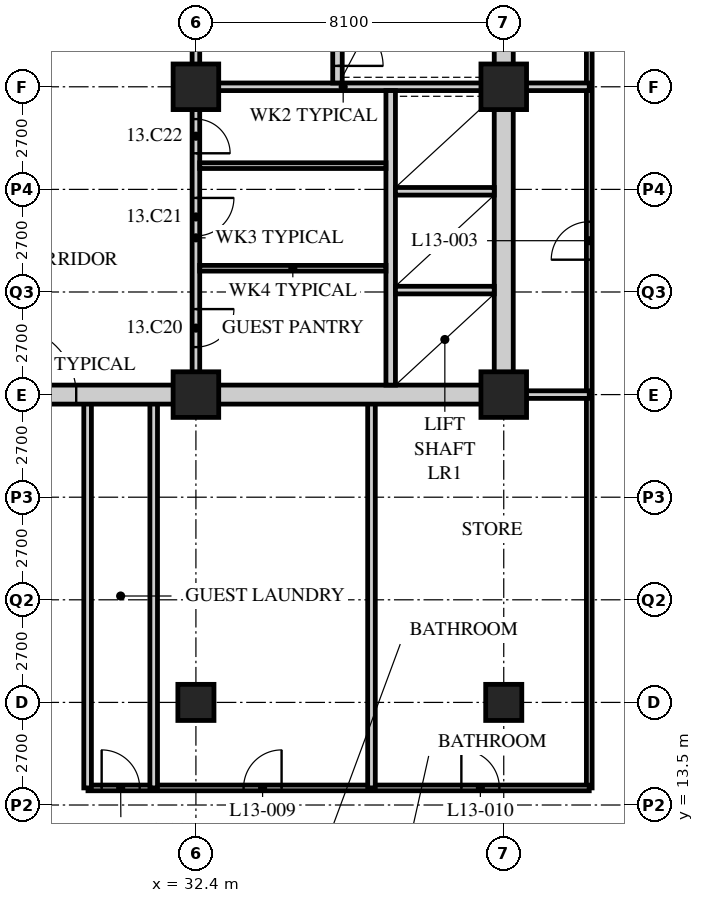
"""IFC4 building model, lengths in metres.
Left out: names, types, materials, properties, quantities, classifications, styles, units other than length and angle.
Written with IfcOpenShell. Run it as: python <this file> out.ifc"""

import sys

from ifc_helpers import new_model, si_unit, direction, frame, frame_2d, origin, origin_2d, place, context, subcontext, project, spatial, rectangle, hollow_rectangle, extrude, element, fill, save


model = new_model("IFC4")
c1 = context("Model", 3, precision=1e-05, world=origin(), true_north=direction((0.0, 1.0)))
c2 = subcontext(c1, "Body", "Model", "MODEL_VIEW")
j1 = project(units=[si_unit("LENGTHUNIT", "METRE"), si_unit("PLANEANGLEUNIT", "RADIAN")], contexts=[c1])
p1 = place(None, origin())
s1 = spatial("IfcSite", under=j1, at=p1, CompositionType="ELEMENT")
p2 = place(p1, origin())
s2 = spatial("IfcBuilding", under=s1, at=p2, CompositionType="ELEMENT")
p3 = place(p2, frame((0.0, 0.0, 56.8)))
s3 = spatial("IfcBuildingStorey", under=s2, at=p3, CompositionType="ELEMENT", Elevation=56.8)
p4 = place(p3, frame((32.4, 16.2, 0.0), z_axis=(0.0, 0.0, 1.0), x_axis=(1.0, 0.0, 0.0)))
e1 = element("IfcColumn", 1, at=p4, inside=s3, PredefinedType="COLUMN", context=c2, shape_type="SweptSolid", body=[
    extrude(hollow_rectangle(XDim=0.95, YDim=0.95, WallThickness=0.095, at=origin_2d()), origin(), (0.0, 0.0, 1.0), 3.4),
])
for number, where, z_axis, x_axis in (
    (2, (32.4, 24.3, 0.0), (0.0, 0.0, 1.0), (1.0, 0.0, 0.0)),
    (3, (32.4, 32.4, 0.0), (0.0, 0.0, 1.0), (1.0, 0.0, 0.0)),
):
    element("IfcColumn", number, at=place(p3, frame(where, z_axis=z_axis, x_axis=x_axis)), inside=s3, PredefinedType="COLUMN", context=c2, shape_type="SweptSolid", body=[
        extrude(hollow_rectangle(XDim=1.2, YDim=1.2, WallThickness=0.12, at=origin_2d()), origin(), (0.0, 0.0, 1.0), 3.4),
    ])
p5 = place(p3, frame((40.5, 16.2, 0.0), z_axis=(0.0, 0.0, 1.0), x_axis=(1.0, 0.0, 0.0)))
e4 = element("IfcColumn", 4, at=p5, inside=s3, PredefinedType="COLUMN", context=c2, shape_type="SweptSolid", body=[
    extrude(hollow_rectangle(XDim=0.95, YDim=0.95, WallThickness=0.095, at=origin_2d()), origin(), (0.0, 0.0, 1.0), 3.4),
])
for number, where, z_axis, x_axis in (
    (5, (40.5, 24.3, 0.0), (0.0, 0.0, 1.0), (1.0, 0.0, 0.0)),
    (6, (40.5, 32.4, 0.0), (0.0, 0.0, 1.0), (1.0, 0.0, 0.0)),
):
    element("IfcColumn", number, at=place(p3, frame(where, z_axis=z_axis, x_axis=x_axis)), inside=s3, PredefinedType="COLUMN", context=c2, shape_type="SweptSolid", body=[
        extrude(hollow_rectangle(XDim=1.2, YDim=1.2, WallThickness=0.12, at=origin_2d()), origin(), (0.0, 0.0, 1.0), 3.4),
    ])
p6 = place(p3, frame((42.75, 13.95, 0.0), z_axis=(0.0, 0.0, 1.0), x_axis=(0.0, 1.0, 0.0)))
e7 = element("IfcWall", 7, at=p6, inside=s3, PredefinedType="PARTITIONING", context=c2, shape_type="SweptSolid", body=[
    extrude(rectangle(XDim=26.55, YDim=0.15, at=frame_2d((13.275, 0.0))), origin(), (0.0, 0.0, 1.0), 3.19),
])
p7 = place(p6, frame((13.9, 0.0, 0.0)))
e8 = element("IfcOpeningElement", 8, at=p7, cuts=e7, PredefinedType="OPENING", context=c2, shape_type="SweptSolid", body=[
    extrude(rectangle(XDim=1.0, YDim=2.1, at=frame_2d((0.5, 1.05))), frame((0.0, 0.085, 0.0), z_axis=(0.0, -1.0, 0.0), x_axis=(1.0, 0.0, 0.0)), (0.0, 0.0, 1.0), 0.17),
])
p8 = place(p6, frame((22.0, 0.0, 0.0)))
e9 = element("IfcOpeningElement", 9, at=p8, cuts=e7, PredefinedType="OPENING", context=c2, shape_type="SweptSolid", body=[
    extrude(rectangle(XDim=1.0, YDim=2.1, at=frame_2d((0.5, 1.05))), frame((0.0, 0.085, 0.0), z_axis=(0.0, -1.0, 0.0), x_axis=(1.0, 0.0, 0.0)), (0.0, 0.0, 1.0), 0.17),
])
p9 = place(p3, frame((29.56, 13.95, 0.0), z_axis=(0.0, 0.0, 1.0), x_axis=(1.0, 0.0, 0.0)))
e10 = element("IfcWall", 10, at=p9, inside=s3, PredefinedType="PARTITIONING", context=c2, shape_type="SweptSolid", body=[
    extrude(rectangle(XDim=13.19, YDim=0.15, at=frame_2d((6.595, 0.0))), origin(), (0.0, 0.0, 1.0), 3.19),
])
p10 = place(p9, frame((0.36, 0.0, 0.0)))
e11 = element("IfcOpeningElement", 11, at=p10, cuts=e10, PredefinedType="OPENING", context=c2, shape_type="SweptSolid", body=[
    extrude(rectangle(XDim=1.0, YDim=2.1, at=frame_2d((0.5, 1.05))), frame((0.0, 0.085, 0.0), z_axis=(0.0, -1.0, 0.0), x_axis=(1.0, 0.0, 0.0)), (0.0, 0.0, 1.0), 0.17),
])
p11 = place(p9, frame((4.094, 0.0, 0.0)))
e12 = element("IfcOpeningElement", 12, at=p11, cuts=e10, PredefinedType="OPENING", context=c2, shape_type="SweptSolid", body=[
    extrude(rectangle(XDim=1.0, YDim=2.1, at=frame_2d((0.5, 1.05))), frame((0.0, 0.085, 0.0), z_axis=(0.0, -1.0, 0.0), x_axis=(1.0, 0.0, 0.0)), (0.0, 0.0, 1.0), 0.17),
])
p12 = place(p9, frame((9.825, 0.0, 0.0)))
e13 = element("IfcOpeningElement", 13, at=p12, cuts=e10, PredefinedType="OPENING", context=c2, shape_type="SweptSolid", body=[
    extrude(rectangle(XDim=1.0, YDim=2.1, at=frame_2d((0.5, 1.05))), frame((0.0, 0.085, 0.0), z_axis=(0.0, -1.0, 0.0), x_axis=(1.0, 0.0, 0.0)), (0.0, 0.0, 1.0), 0.17),
])
p13 = place(p3, frame((40.5, 32.4, 0.0), z_axis=(0.0, 0.0, 1.0), x_axis=(1.0, 0.0, 0.0)))
e14 = element("IfcWall", 14, at=p13, inside=s3, PredefinedType="SOLIDWALL", context=c2, shape_type="SweptSolid", body=[
    extrude(rectangle(XDim=2.25, YDim=0.2, at=frame_2d((1.125, 0.0))), origin(), (0.0, 0.0, 1.0), 2.578),
])
for number, where, z_axis, x_axis in (
    (15, (31.289, 13.95, 0.0), (0.0, 0.0, 1.0), (0.0, 1.0, 0.0)),
    (16, (37.02, 13.95, 0.0), (0.0, 0.0, 1.0), (0.0, 1.0, 0.0)),
    (17, (29.55, 13.95, 0.0), (0.0, 0.0, 1.0), (0.0, 1.0, 0.0)),
):
    element("IfcWall", number, at=place(p3, frame(where, z_axis=z_axis, x_axis=x_axis)), inside=s3, PredefinedType="SOLIDWALL", context=c2, shape_type="SweptSolid", body=[
        extrude(rectangle(XDim=10.35, YDim=0.2, at=frame_2d((5.175, 0.0))), origin(), (0.0, 0.0, 1.0), 3.19),
    ])
p14 = place(p3, frame((40.5, 24.3, 0.0), z_axis=(0.0, 0.0, 1.0), x_axis=(1.0, 0.0, 0.0)))
e18 = element("IfcWall", 18, at=p14, inside=s3, PredefinedType="SOLIDWALL", context=c2, shape_type="SweptSolid", body=[
    extrude(rectangle(XDim=2.25, YDim=0.2, at=frame_2d((1.125, 0.0))), origin(), (0.0, 0.0, 1.0), 2.578),
])
p15 = place(p3, frame((15.95, 24.3, 0.0), z_axis=(0.0, 0.0, 1.0), x_axis=(1.0, 0.0, 0.0)))
e19 = element("IfcWall", 19, at=p15, inside=s3, PredefinedType="SOLIDWALL", context=c2, shape_type="SweptSolid", body=[
    extrude(rectangle(XDim=24.8, YDim=0.5, at=frame_2d((12.4, 0.0))), origin(), (0.0, 0.0, 1.0), 2.54),
])
p16 = place(p15, frame((11.5, 0.0, 0.0)))
e20 = element("IfcOpeningElement", 20, at=p16, cuts=e19, PredefinedType="OPENING", context=c2, shape_type="SweptSolid", body=[
    extrude(rectangle(XDim=1.8, YDim=2.4, at=frame_2d((0.9, 1.2))), frame((0.0, 0.26, 0.0), z_axis=(0.0, -1.0, 0.0), x_axis=(1.0, 0.0, 0.0)), (0.0, 0.0, 1.0), 0.52),
])
p17 = place(p3, frame((40.5, 24.55, 0.0), z_axis=(0.0, 0.0, 1.0), x_axis=(0.0, 1.0, 0.0)))
e21 = element("IfcWall", 21, at=p17, inside=s3, PredefinedType="SOLIDWALL", context=c2, shape_type="SweptSolid", body=[
    extrude(rectangle(XDim=15.7, YDim=0.5, at=frame_2d((7.85, 0.0))), origin(), (0.0, 0.0, 1.0), 2.578),
])
p18 = place(p3, frame((32.3, 32.4, 0.0), z_axis=(0.0, 0.0, 1.0), x_axis=(1.0, 0.0, 0.0)))
e22 = element("IfcWall", 22, at=p18, inside=s3, PredefinedType="SOLIDWALL", context=c2, shape_type="SweptSolid", body=[
    extrude(rectangle(XDim=7.95, YDim=0.2, at=frame_2d((3.975, 0.0))), origin(), (0.0, 0.0, 1.0), 2.578),
])
p19 = place(p3, frame((32.4, 32.5, 0.0), z_axis=(0.0, 0.0, 1.0), x_axis=(0.0, 1.0, 0.0)))
e23 = element("IfcWall", 23, at=p19, inside=s3, PredefinedType="SOLIDWALL", context=c2, shape_type="SweptSolid", body=[
    extrude(rectangle(XDim=7.75, YDim=0.2, at=frame_2d((3.875, 0.0))), origin(), (0.0, 0.0, 1.0), 2.578),
])
p20 = place(p19, frame((1.9, 0.0, 0.0)))
e24 = element("IfcOpeningElement", 24, at=p20, cuts=e23, PredefinedType="OPENING", context=c2, shape_type="SweptSolid", body=[
    extrude(rectangle(XDim=1.2, YDim=2.1, at=frame_2d((0.6, 1.05))), frame((0.0, 0.11, 0.0), z_axis=(0.0, -1.0, 0.0), x_axis=(1.0, 0.0, 0.0)), (0.0, 0.0, 1.0), 0.22),
])
p21 = place(p3, frame((37.525, 24.55, 0.0), z_axis=(0.0, 0.0, 1.0), x_axis=(0.0, 1.0, 0.0)))
e25 = element("IfcWall", 25, at=p21, inside=s3, PredefinedType="SOLIDWALL", context=c2, shape_type="SweptSolid", body=[
    extrude(rectangle(XDim=7.75, YDim=0.25, at=frame_2d((3.875, 0.0))), origin(), (0.0, 0.0, 1.0), 3.19),
])
for number, where, z_axis, x_axis in (
    (26, (37.65, 27.05, 0.0), (0.0, 0.0, 1.0), (1.0, 0.0, 0.0)),
    (27, (37.65, 29.65, 0.0), (0.0, 0.0, 1.0), (1.0, 0.0, 0.0)),
):
    element("IfcWall", number, at=place(p3, frame(where, z_axis=z_axis, x_axis=x_axis)), inside=s3, PredefinedType="SOLIDWALL", context=c2, shape_type="SweptSolid", body=[
        extrude(rectangle(XDim=2.6, YDim=0.2, at=frame_2d((1.3, 0.0))), origin(), (0.0, 0.0, 1.0), 3.19),
    ])
p22 = place(p3, frame((36.125, 32.5, 0.0), z_axis=(0.0, 0.0, 1.0), x_axis=(0.0, 1.0, 0.0)))
e28 = element("IfcWall", 28, at=p22, inside=s3, PredefinedType="SOLIDWALL", context=c2, shape_type="SweptSolid", body=[
    extrude(rectangle(XDim=7.75, YDim=0.25, at=frame_2d((3.875, 0.0))), origin(), (0.0, 0.0, 1.0), 3.19),
])
p23 = place(p22, frame((0.45, 0.0, 0.0)))
e29 = element("IfcOpeningElement", 29, at=p23, cuts=e28, PredefinedType="OPENING", context=c2, shape_type="SweptSolid", body=[
    extrude(rectangle(XDim=1.2, YDim=2.1, at=frame_2d((0.6, 1.05))), frame((0.0, 0.135, 0.0), z_axis=(0.0, -1.0, 0.0), x_axis=(1.0, 0.0, 0.0)), (0.0, 0.0, 1.0), 0.27),
])
p24 = place(p3, frame((32.4, 24.55, 0.0), z_axis=(0.0, 0.0, 1.0), x_axis=(0.0, 1.0, 0.0)))
e30 = element("IfcWall", 30, at=p24, inside=s3, PredefinedType="PARTITIONING", context=c2, shape_type="SweptSolid", body=[
    extrude(rectangle(XDim=7.75, YDim=0.2, at=frame_2d((3.875, 0.0))), origin(), (0.0, 0.0, 1.0), 2.578),
])
p25 = place(p24, frame((1.0, 0.0, 0.0)))
e31 = element("IfcOpeningElement", 31, at=p25, cuts=e30, PredefinedType="OPENING", context=c2, shape_type="SweptSolid", body=[
    extrude(rectangle(XDim=1.0, YDim=2.1, at=frame_2d((0.5, 1.05))), frame((0.0, 0.11, 0.0), z_axis=(0.0, -1.0, 0.0), x_axis=(1.0, 0.0, 0.0)), (0.0, 0.0, 1.0), 0.22),
])
p26 = place(p24, frame((3.925, 0.0, 0.0)))
e32 = element("IfcOpeningElement", 32, at=p26, cuts=e30, PredefinedType="OPENING", context=c2, shape_type="SweptSolid", body=[
    extrude(rectangle(XDim=1.0, YDim=2.1, at=frame_2d((0.5, 1.05))), frame((0.0, 0.11, 0.0), z_axis=(0.0, -1.0, 0.0), x_axis=(1.0, 0.0, 0.0)), (0.0, 0.0, 1.0), 0.22),
])
p27 = place(p24, frame((6.1, 0.0, 0.0)))
e33 = element("IfcOpeningElement", 33, at=p27, cuts=e30, PredefinedType="OPENING", context=c2, shape_type="SweptSolid", body=[
    extrude(rectangle(XDim=0.9, YDim=2.1, at=frame_2d((0.45, 1.05))), frame((0.0, 0.11, 0.0), z_axis=(0.0, -1.0, 0.0), x_axis=(1.0, 0.0, 0.0)), (0.0, 0.0, 1.0), 0.22),
])
for number, where, z_axis, x_axis in (
    (34, (32.5, 27.625, 0.0), (0.0, 0.0, 1.0), (1.0, 0.0, 0.0)),
    (35, (32.5, 30.325, 0.0), (0.0, 0.0, 1.0), (1.0, 0.0, 0.0)),
):
    element("IfcWall", number, at=place(p3, frame(where, z_axis=z_axis, x_axis=x_axis)), inside=s3, PredefinedType="PARTITIONING", context=c2, shape_type="SweptSolid", body=[
        extrude(rectangle(XDim=4.9, YDim=0.15, at=frame_2d((2.45, 0.0))), origin(), (0.0, 0.0, 1.0), 3.19),
    ])
p28 = place(p7, origin())
e36 = element("IfcDoor", 36, at=p28, inside=s3, OperationType="SINGLE_SWING_LEFT", PredefinedType="DOOR", context=c2, shape_type="SweptSolid", body=[
    extrude(rectangle(XDim=1.0, YDim=2.1, at=frame_2d((0.5, 1.05))), frame((0.0, 0.025, 0.0), z_axis=(0.0, -1.0, 0.0), x_axis=(1.0, 0.0, 0.0)), (0.0, 0.0, 1.0), 0.05),
])
fill(e8, e36)
p29 = place(p10, origin())
e37 = element("IfcDoor", 37, at=p29, inside=s3, OperationType="SINGLE_SWING_LEFT", PredefinedType="DOOR", context=c2, shape_type="SweptSolid", body=[
    extrude(rectangle(XDim=1.0, YDim=2.1, at=frame_2d((0.5, 1.05))), frame((0.0, 0.025, 0.0), z_axis=(0.0, -1.0, 0.0), x_axis=(1.0, 0.0, 0.0)), (0.0, 0.0, 1.0), 0.05),
])
fill(e11, e37)
p30 = place(p11, origin())
e38 = element("IfcDoor", 38, at=p30, inside=s3, OperationType="SINGLE_SWING_RIGHT", PredefinedType="DOOR", context=c2, shape_type="SweptSolid", body=[
    extrude(rectangle(XDim=1.0, YDim=2.1, at=frame_2d((0.5, 1.05))), frame((0.0, 0.025, 0.0), z_axis=(0.0, -1.0, 0.0), x_axis=(1.0, 0.0, 0.0)), (0.0, 0.0, 1.0), 0.05),
])
fill(e12, e38)
p31 = place(p12, origin())
e39 = element("IfcDoor", 39, at=p31, inside=s3, OperationType="SINGLE_SWING_LEFT", PredefinedType="DOOR", context=c2, shape_type="SweptSolid", body=[
    extrude(rectangle(XDim=1.0, YDim=2.1, at=frame_2d((0.5, 1.05))), frame((0.0, 0.025, 0.0), z_axis=(0.0, -1.0, 0.0), x_axis=(1.0, 0.0, 0.0)), (0.0, 0.0, 1.0), 0.05),
])
fill(e13, e39)
p32 = place(p25, origin())
e40 = element("IfcDoor", 40, at=p32, inside=s3, OperationType="SINGLE_SWING_LEFT", PredefinedType="DOOR", context=c2, shape_type="SweptSolid", body=[
    extrude(rectangle(XDim=1.0, YDim=2.1, at=frame_2d((0.5, 1.05))), frame((0.0, 0.025, 0.0), z_axis=(0.0, -1.0, 0.0), x_axis=(1.0, 0.0, 0.0)), (0.0, 0.0, 1.0), 0.05),
])
fill(e31, e40)
p33 = place(p26, origin())
e41 = element("IfcDoor", 41, at=p33, inside=s3, OperationType="SINGLE_SWING_LEFT", PredefinedType="DOOR", context=c2, shape_type="SweptSolid", body=[
    extrude(rectangle(XDim=1.0, YDim=2.1, at=frame_2d((0.5, 1.05))), frame((0.0, 0.025, 0.0), z_axis=(0.0, -1.0, 0.0), x_axis=(1.0, 0.0, 0.0)), (0.0, 0.0, 1.0), 0.05),
])
fill(e32, e41)
p34 = place(p27, origin())
e42 = element("IfcDoor", 42, at=p34, inside=s3, OperationType="SINGLE_SWING_RIGHT", PredefinedType="DOOR", context=c2, shape_type="SweptSolid", body=[
    extrude(rectangle(XDim=0.9, YDim=2.1, at=frame_2d((0.45, 1.05))), frame((0.0, 0.025, 0.0), z_axis=(0.0, -1.0, 0.0), x_axis=(1.0, 0.0, 0.0)), (0.0, 0.0, 1.0), 0.05),
])
fill(e33, e42)
p35 = place(p23, origin())
e43 = element("IfcDoor", 43, at=p35, inside=s3, OperationType="SINGLE_SWING_RIGHT", PredefinedType="DOOR", context=c2, shape_type="SweptSolid", body=[
    extrude(rectangle(XDim=1.2, YDim=2.1, at=frame_2d((0.6, 1.05))), frame((0.0, 0.025, 0.0), z_axis=(0.0, -1.0, 0.0), x_axis=(1.0, 0.0, 0.0)), (0.0, 0.0, 1.0), 0.05),
])
fill(e29, e43)
p36 = place(p16, origin())
e44 = element("IfcDoor", 44, at=p36, inside=s3, OperationType="DOUBLE_DOOR_SINGLE_SWING", PredefinedType="DOOR", context=c2, shape_type="SweptSolid", body=[
    extrude(rectangle(XDim=1.8, YDim=2.4, at=frame_2d((0.9, 1.2))), frame((0.0, 0.025, 0.0), z_axis=(0.0, -1.0, 0.0), x_axis=(1.0, 0.0, 0.0)), (0.0, 0.0, 1.0), 0.05),
])
fill(e20, e44)
save(model, sys.argv[1])
